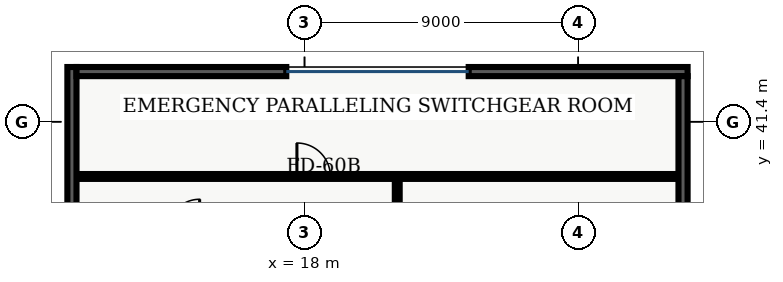
"""IFC4 building model, lengths in metres.
Left out: names, types, materials, properties, quantities, classifications, styles, units other than length and angle.
Written with IfcOpenShell. Run it as: python <this file> out.ifc"""

import sys

from ifc_helpers import new_model, entity, si_unit, converted_unit, direction, frame, origin_with_axes, origin_2d_with_axis, place, context, subcontext, project, spatial, polyline, rectangle, outline, extrude, element, fill, save


model = new_model("IFC4")
c1 = context("Model", 3, precision=1e-05, world=origin_with_axes(), true_north=direction((0.0, 1.0)))
c2 = subcontext(c1, "Body", "Model", "MODEL_VIEW")
j1 = project(units=[si_unit("LENGTHUNIT", "METRE"), converted_unit("PLANEANGLEUNIT", "DEGREE", entity("IfcPlaneAngleMeasure", 0.017), si_unit("PLANEANGLEUNIT", "RADIAN"), dimensions=[0, 0, 0, 0, 0, 0, 0])], contexts=[c1])
p1 = place(None, origin_with_axes())
s1 = spatial("IfcSite", under=j1, at=p1, CompositionType="ELEMENT")
p2 = place(p1, origin_with_axes())
s2 = spatial("IfcBuilding", under=s1, at=p2, CompositionType="ELEMENT")
p3 = place(p2, frame((0.0, 0.0, 320.4), z_axis=(0.0, 0.0, 1.0), x_axis=(1.0, 0.0, 0.0)))
s3 = spatial("IfcBuildingStorey", under=s2, at=p3, CompositionType="ELEMENT", Elevation=320.4)
p4 = place(p3, frame((21.05, 34.4, 0.0), z_axis=(0.0, 0.0, 1.0), x_axis=(0.0, 1.0, 0.0)))
e1 = element("IfcWall", 1, at=p4, inside=s3, PredefinedType="PARTITIONING", context=c2, shape_type="SweptSolid", body=[
    extrude(outline(polyline([(0.0, -0.08), (5.2, -0.08), (5.2, 0.08), (0.0, 0.08), (0.0, -0.08)])), origin_with_axes(), (0.0, 0.0, 1.0), 2.68),
])
p5 = place(p4, frame((1.45, 0.0, 0.0), z_axis=(0.0, 0.0, 1.0), x_axis=(1.0, 0.0, 0.0)))
e2 = element("IfcOpeningElement", 2, at=p5, cuts=e1, PredefinedType="OPENING", context=c2, shape_type="SweptSolid", body=[
    extrude(rectangle(XDim=0.9, YDim=0.18, at=origin_2d_with_axis()), origin_with_axes(), (0.0, 0.0, 1.0), 2.15),
])
p6 = place(p3, frame((10.495, 39.6, 0.0), z_axis=(0.0, 0.0, 1.0), x_axis=(1.0, 0.0, 0.0)))
e3 = element("IfcWall", 3, at=p6, inside=s3, PredefinedType="PARTITIONING", context=c2, shape_type="SweptSolid", body=[
    extrude(outline(polyline([(0.0, -0.08), (19.81, -0.08), (19.81, 0.08), (0.0, 0.08), (0.0, -0.08)])), origin_with_axes(), (0.0, 0.0, 1.0), 2.68),
])
p7 = place(p6, frame((7.805, 0.0, 0.0), z_axis=(0.0, 0.0, 1.0), x_axis=(1.0, 0.0, 0.0)))
e4 = element("IfcOpeningElement", 4, at=p7, cuts=e3, PredefinedType="OPENING", context=c2, shape_type="SweptSolid", body=[
    extrude(rectangle(XDim=1.1, YDim=0.18, at=origin_2d_with_axis()), origin_with_axes(), (0.0, 0.0, 1.0), 2.15),
])
p8 = place(p3, frame((10.35, 5.7, 0.0), z_axis=(0.0, 0.0, 1.0), x_axis=(0.0, 1.0, 0.0)))
e5 = element("IfcWall", 5, at=p8, inside=s3, PredefinedType="SOLIDWALL", context=c2, shape_type="SweptSolid", body=[
    extrude(outline(polyline([(0.0, -0.15), (37.5, -0.15), (37.5, 0.15), (0.0, 0.15), (0.0, -0.15)])), origin_with_axes(), (0.0, 0.0, 1.0), 3.64),
])
p9 = place(p3, frame((10.5, 43.05, 0.0), z_axis=(0.0, 0.0, 1.0), x_axis=(1.0, 0.0, 0.0)))
e6 = element("IfcWall", 6, at=p9, inside=s3, PredefinedType="SOLIDWALL", context=c2, shape_type="SweptSolid", body=[
    extrude(outline(polyline([(0.0, -0.15), (6.9, -0.15), (6.9, 0.15), (0.0, 0.15), (0.0, -0.15)])), origin_with_axes(), (0.0, 0.0, 1.0), 3.64),
])
p10 = place(p3, frame((23.4, 43.05, 0.0), z_axis=(0.0, 0.0, 1.0), x_axis=(1.0, 0.0, 0.0)))
e7 = element("IfcWall", 7, at=p10, inside=s3, PredefinedType="SOLIDWALL", context=c2, shape_type="SweptSolid", body=[
    extrude(outline(polyline([(0.0, -0.15), (7.2, -0.15), (7.2, 0.15), (0.0, 0.15), (0.0, -0.15)])), origin_with_axes(), (0.0, 0.0, 1.0), 3.64),
])
p11 = place(p3, frame((30.45, 42.9, 0.0), z_axis=(0.0, 0.0, 1.0), x_axis=(0.0, -1.0, 0.0)))
e8 = element("IfcWall", 8, at=p11, inside=s3, PredefinedType="SOLIDWALL", context=c2, shape_type="SweptSolid", body=[
    extrude(outline(polyline([(0.0, -0.15), (5.9, -0.15), (5.9, 0.15), (0.0, 0.15), (0.0, -0.15)])), origin_with_axes(), (0.0, 0.0, 1.0), 3.64),
])
p12 = place(p6, frame((7.805, 0.0, 0.0), z_axis=(0.0, 0.0, 1.0), x_axis=(1.0, 0.0, 0.0)))
e9 = element("IfcDoor", 9, at=p12, inside=s3, OperationType="SINGLE_SWING_LEFT", PredefinedType="DOOR", context=c2, shape_type="SweptSolid", body=[
    extrude(rectangle(XDim=1.1, YDim=0.09, at=origin_2d_with_axis()), origin_with_axes(), (0.0, 0.0, 1.0), 2.15),
])
fill(e4, e9)
save(model, sys.argv[1])
